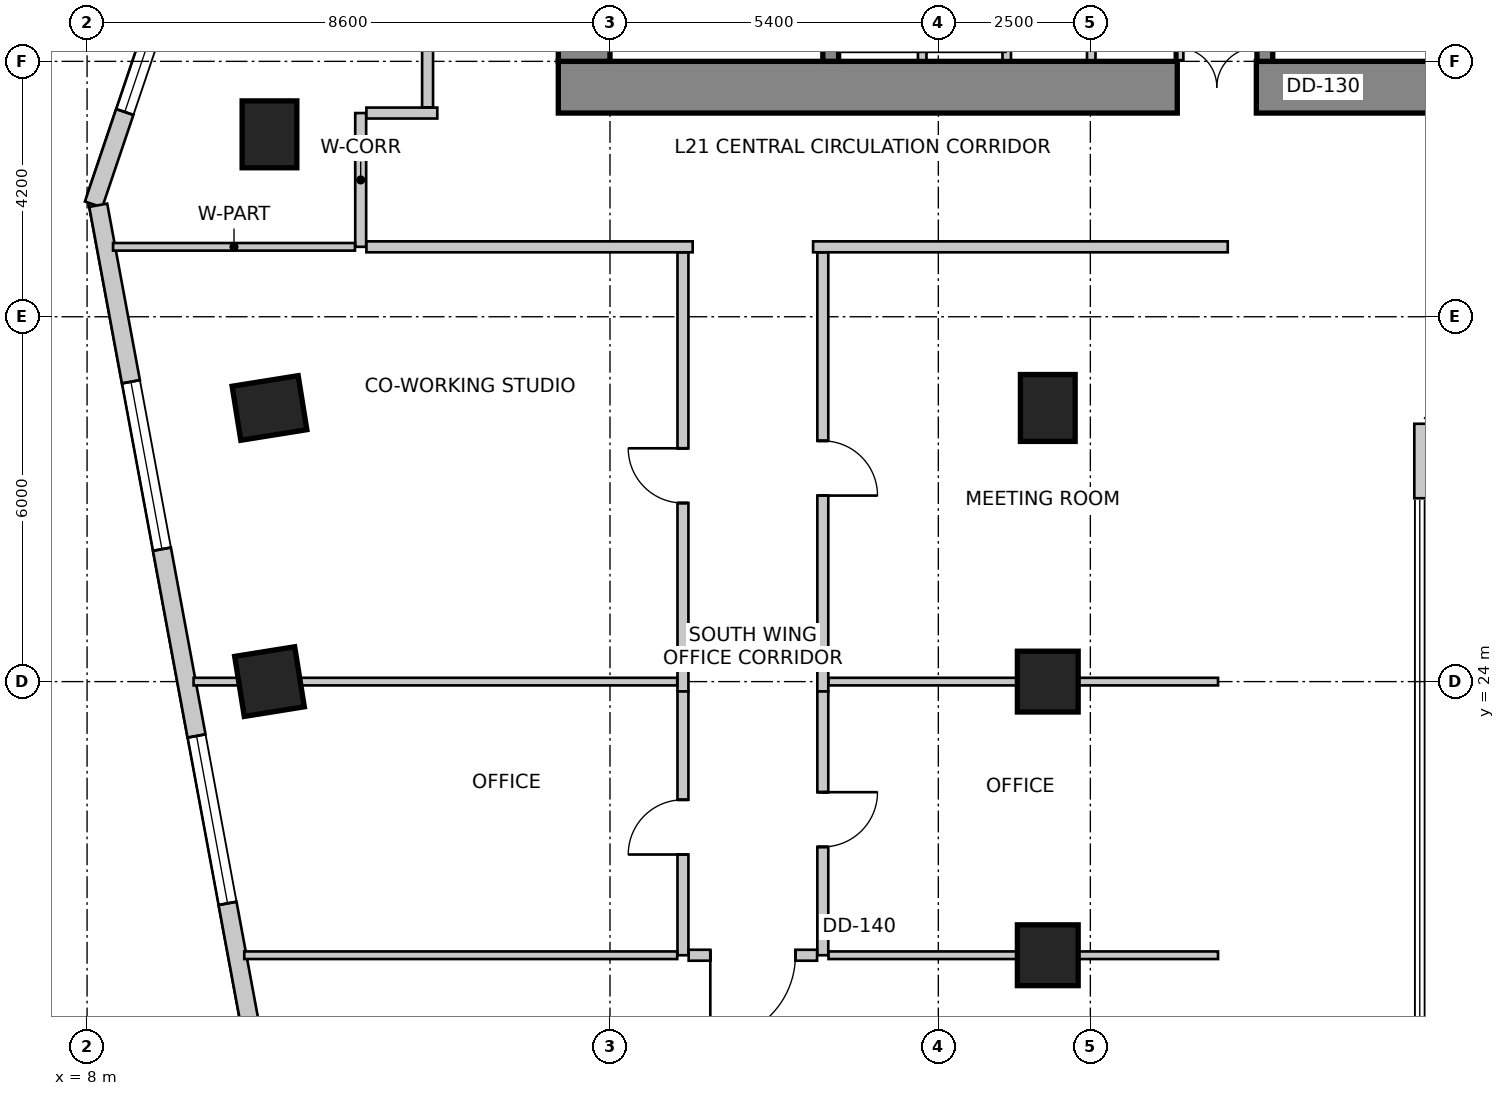
"""IFC4 building model, lengths in metres.
Left out: names, types, materials, properties, quantities, classifications, styles, units other than length and angle.
Written with IfcOpenShell. Run it as: python <this file> out.ifc"""

import sys

from ifc_helpers import new_model, si_unit, direction, frame, frame_2d, origin, origin_2d, place, context, subcontext, project, spatial, rectangle, extrude, source, transform, mapped, element, fill, save


model = new_model("IFC4")
c1 = context("Model", 3, precision=1e-05, world=origin(), true_north=direction((0.0, 1.0)))
c2 = subcontext(c1, "Body", "Model", "MODEL_VIEW")
j1 = project(units=[si_unit("LENGTHUNIT", "METRE"), si_unit("PLANEANGLEUNIT", "RADIAN")], contexts=[c1])
p1 = place(None, origin())
s1 = spatial("IfcSite", under=j1, at=p1, CompositionType="ELEMENT")
p2 = place(p1, origin())
s2 = spatial("IfcBuilding", under=s1, at=p2, CompositionType="ELEMENT")
p3 = place(p2, frame((0.0, 0.0, 87.0)))
s3 = spatial("IfcBuildingStorey", under=s2, at=p3, CompositionType="ELEMENT", Elevation=87.0)
p4 = place(p3, frame((15.75, 33.775, 0.0), z_axis=(0.0, 0.0, 1.0), x_axis=(1.0, 0.0, 0.0)))
e1 = element("IfcWall", 1, at=p4, inside=s3, PredefinedType="SHEAR", context=c2, shape_type="SweptSolid", body=[
    extrude(rectangle(XDim=16.1, YDim=0.85, at=frame_2d((8.05, 0.0))), origin(), (0.0, 0.0, 1.0), 4.0),
])
m1 = source(origin(), c2, "Body", "SweptSolid", [
    extrude(rectangle(XDim=1.3, YDim=2.15, at=frame_2d((0.65, 1.075))), frame((0.0, 0.435, 0.0), z_axis=(0.0, -1.0, 0.0), x_axis=(1.0, 0.0, 0.0)), (0.0, 0.0, 1.0), 0.87),
])
p5 = place(p4, frame((10.18, 0.0, 0.0)))
e2 = element("IfcOpeningElement", 2, at=p5, cuts=e1, PredefinedType="OPENING", context=c2, shape_type="MappedRepresentation", body=[
    mapped(m1, transform((0.0, 0.0, 0.0), scale=1.0)),
])
p6 = place(p3, frame((16.175, 34.2, 0.0), z_axis=(0.0, 0.0, 1.0), x_axis=(0.0, 1.0, 0.0)))
e3 = element("IfcWall", 3, at=p6, inside=s3, PredefinedType="SHEAR", context=c2, shape_type="SweptSolid", body=[
    extrude(rectangle(XDim=11.4, YDim=0.85, at=frame_2d((5.7, 0.0))), origin(), (0.0, 0.0, 1.0), 4.0),
])
m2 = source(origin(), c2, "Body", "SweptSolid", [
    extrude(rectangle(XDim=1.1, YDim=2.15, at=frame_2d((0.55, 1.075))), frame((0.0, 0.435, 0.0), z_axis=(0.0, -1.0, 0.0), x_axis=(1.0, 0.0, 0.0)), (0.0, 0.0, 1.0), 0.87),
])
p7 = place(p6, frame((7.15, 0.0, 0.0)))
e4 = element("IfcOpeningElement", 4, at=p7, cuts=e3, PredefinedType="OPENING", context=c2, shape_type="MappedRepresentation", body=[
    mapped(m2, transform((0.0, 0.0, 0.0), scale=1.0)),
])
p8 = place(p3, frame((20.23, 34.2, 0.0), z_axis=(0.0, 0.0, 1.0), x_axis=(0.0, 1.0, 0.0)))
e5 = element("IfcWall", 5, at=p8, inside=s3, PredefinedType="SHEAR", context=c2, shape_type="SweptSolid", body=[
    extrude(rectangle(XDim=9.06, YDim=0.26, at=frame_2d((4.53, 0.0))), origin(), (0.0, 0.0, 1.0), 4.0),
])
m3 = source(origin(), c2, "Body", "SweptSolid", [
    extrude(rectangle(XDim=1.1, YDim=2.15, at=frame_2d((0.55, 1.075))), frame((0.0, 0.14, 0.0), z_axis=(0.0, -1.0, 0.0), x_axis=(1.0, 0.0, 0.0)), (0.0, 0.0, 1.0), 0.28),
])
p9 = place(p8, frame((7.45, 0.0, 0.0)))
e6 = element("IfcOpeningElement", 6, at=p9, cuts=e5, PredefinedType="OPENING", context=c2, shape_type="MappedRepresentation", body=[
    mapped(m3, transform((0.0, 0.0, 0.0), scale=1.0)),
])
p10 = place(p3, frame((27.37, 34.2, 0.0), z_axis=(0.0, 0.0, 1.0), x_axis=(0.0, 1.0, 0.0)))
e7 = element("IfcWall", 7, at=p10, inside=s3, PredefinedType="SHEAR", context=c2, shape_type="SweptSolid", body=[
    extrude(rectangle(XDim=9.06, YDim=0.26, at=frame_2d((4.53, 0.0))), origin(), (0.0, 0.0, 1.0), 4.0),
])
p11 = place(p10, frame((7.45, 0.0, 0.0)))
e8 = element("IfcOpeningElement", 8, at=p11, cuts=e7, PredefinedType="OPENING", context=c2, shape_type="MappedRepresentation", body=[
    mapped(m3, transform((0.0, 0.0, 0.0), scale=1.0)),
])
m4 = source(origin(), c2, "Body", "SweptSolid", [
    extrude(rectangle(XDim=0.9, YDim=1.1, at=origin_2d()), origin(), (0.0, 0.0, 1.0), 4.0),
])
for number, where, z_axis, x_axis in (
    (9, (11.0, 33.0, 0.0), (0.0, 0.0, 1.0), (1.0, 0.0, 0.0)),
    (10, (11.0, 28.5, 0.0), (0.0, 0.0, 1.0), (0.158, -0.987, 0.0)),
):
    element("IfcColumn", number, at=place(p3, frame(where, z_axis=z_axis, x_axis=x_axis)), inside=s3, PredefinedType="COLUMN", context=c2, shape_type="MappedRepresentation", body=[
        mapped(m4, transform((0.0, 0.0, 0.0), scale=1.0)),
    ])
m5 = source(origin(), c2, "Body", "SweptSolid", [
    extrude(rectangle(XDim=1.0, YDim=1.0, at=origin_2d()), origin(), (0.0, 0.0, 1.0), 4.0),
])
p12 = place(p3, frame((11.0, 24.0, 0.0), z_axis=(0.0, 0.0, 1.0), x_axis=(0.158158067254, -0.987413806751, 0.0)))
e11 = element("IfcColumn", 11, at=p12, inside=s3, PredefinedType="COLUMN", context=c2, shape_type="MappedRepresentation", body=[
    mapped(m5, transform((0.0, 0.0, 0.0), scale=1.0)),
])
p13 = place(p3, frame((23.8, 28.5, 0.0), z_axis=(0.0, 0.0, 1.0), x_axis=(1.0, 0.0, 0.0)))
e12 = element("IfcColumn", 12, at=p13, inside=s3, PredefinedType="COLUMN", context=c2, shape_type="MappedRepresentation", body=[
    mapped(m4, transform((0.0, 0.0, 0.0), scale=1.0)),
])
for number, where, z_axis, x_axis in (
    (13, (23.8, 24.0, 0.0), (0.0, 0.0, 1.0), (1.0, 0.0, 0.0)),
    (14, (23.8, 19.5, 0.0), (0.0, 0.0, 1.0), (1.0, 0.0, 0.0)),
):
    element("IfcColumn", number, at=place(p3, frame(where, z_axis=z_axis, x_axis=x_axis)), inside=s3, PredefinedType="COLUMN", context=c2, shape_type="MappedRepresentation", body=[
        mapped(m5, transform((0.0, 0.0, 0.0), scale=1.0)),
    ])
p14 = place(p3, frame((29.978, 27.015, 0.0), z_axis=(0.0, 0.0, 1.0), x_axis=(0.0, 1.0, 0.0)))
e15 = element("IfcWall", 15, at=p14, inside=s3, PredefinedType="SOLIDWALL", context=c2, shape_type="SweptSolid", body=[
    extrude(rectangle(XDim=1.225, YDim=0.3, at=frame_2d((0.612, 0.0))), origin(), (0.0, 0.0, 1.0), 3.75),
])
p15 = place(p3, frame((13.269, 47.134, 0.0), z_axis=(0.0, 0.0, 1.0), x_axis=(-0.319920423265, -0.947444416722, 0.0)))
e16 = element("IfcWall", 16, at=p15, inside=s3, PredefinedType="SOLIDWALL", context=c2, shape_type="SweptSolid", body=[
    extrude(rectangle(XDim=16.135, YDim=0.3, at=frame_2d((8.067, 0.0))), origin(), (0.0, 0.0, 1.0), 3.75),
])
m6 = source(origin(), c2, "Body", "SweptSolid", [
    extrude(rectangle(XDim=2.4, YDim=2.2, at=frame_2d((1.2, 1.1))), frame((0.0, 0.16, 0.0), z_axis=(0.0, -1.0, 0.0), x_axis=(1.0, 0.0, 0.0)), (0.0, 0.0, 1.0), 0.32),
])
p16 = place(p15, frame((2.188, 0.0, 0.85)))
e17 = element("IfcOpeningElement", 17, at=p16, cuts=e16, PredefinedType="OPENING", context=c2, shape_type="MappedRepresentation", body=[
    mapped(m6, transform((0.0, 0.0, 0.0), scale=1.0)),
])
m7 = source(origin(), c2, "Body", "SweptSolid", [
    extrude(rectangle(XDim=2.8, YDim=2.4, at=frame_2d((1.4, 1.2))), frame((0.0, 0.16, 0.0), z_axis=(0.0, -1.0, 0.0), x_axis=(1.0, 0.0, 0.0)), (0.0, 0.0, 1.0), 0.32),
])
p17 = place(p15, frame((6.959, 0.0, 0.85)))
e18 = element("IfcOpeningElement", 18, at=p17, cuts=e16, PredefinedType="OPENING", context=c2, shape_type="MappedRepresentation", body=[
    mapped(m7, transform((0.0, 0.0, 0.0), scale=1.0)),
])
p18 = place(p15, frame((12.13, 0.0, 0.85)))
e19 = element("IfcOpeningElement", 19, at=p18, cuts=e16, PredefinedType="OPENING", context=c2, shape_type="MappedRepresentation", body=[
    mapped(m6, transform((0.0, 0.0, 0.0), scale=1.0)),
])
p19 = place(p3, frame((8.183, 31.833, 0.0), z_axis=(0.0, 0.0, 1.0), x_axis=(0.18216364648, -0.983268226834, 0.0)))
e20 = element("IfcWall", 20, at=p19, inside=s3, PredefinedType="SOLIDWALL", context=c2, shape_type="SweptSolid", body=[
    extrude(rectangle(XDim=26.678, YDim=0.3, at=frame_2d((13.339, 0.0))), origin(), (0.0, 0.0, 1.0), 3.75),
])
p20 = place(p19, frame((2.952, 0.0, 0.85)))
e21 = element("IfcOpeningElement", 21, at=p20, cuts=e20, PredefinedType="OPENING", context=c2, shape_type="MappedRepresentation", body=[
    mapped(m7, transform((0.0, 0.0, 0.0), scale=1.0)),
])
p21 = place(p19, frame((8.876, 0.0, 0.85)))
e22 = element("IfcOpeningElement", 22, at=p21, cuts=e20, PredefinedType="OPENING", context=c2, shape_type="MappedRepresentation", body=[
    mapped(m7, transform((0.0, 0.0, 0.0), scale=1.0)),
])
p22 = place(p19, frame((13.647, 0.0, 0.85)))
e23 = element("IfcOpeningElement", 23, at=p22, cuts=e20, PredefinedType="OPENING", context=c2, shape_type="MappedRepresentation", body=[
    mapped(m7, transform((0.0, 0.0, 0.0), scale=1.0)),
])
p23 = place(p19, frame((18.372, 0.0, 0.85)))
e24 = element("IfcOpeningElement", 24, at=p23, cuts=e20, PredefinedType="OPENING", context=c2, shape_type="MappedRepresentation", body=[
    mapped(m6, transform((0.0, 0.0, 0.0), scale=1.0)),
])
p24 = place(p19, frame((22.696, 0.0, 0.85)))
e25 = element("IfcOpeningElement", 25, at=p24, cuts=e20, PredefinedType="OPENING", context=c2, shape_type="MappedRepresentation", body=[
    mapped(m7, transform((0.0, 0.0, 0.0), scale=1.0)),
])
for number, where, z_axis, x_axis in (
    (26, (25.96, 34.22, 0.0), (0.0, 0.0, 1.0), (0.0, 1.0, 0.0)),
    (27, (21.735, 34.22, 0.0), (0.0, 0.0, 1.0), (0.0, 1.0, 0.0)),
    (28, (23.125, 34.22, 0.0), (0.0, 0.0, 1.0), (0.0, 1.0, 0.0)),
    (29, (24.515, 34.22, 0.0), (0.0, 0.0, 1.0), (0.0, 1.0, 0.0)),
):
    element("IfcWall", number, at=place(p3, frame(where, z_axis=z_axis, x_axis=x_axis)), inside=s3, PredefinedType="SOLIDWALL", context=c2, shape_type="SweptSolid", body=[
        extrude(rectangle(XDim=1.62, YDim=0.14, at=frame_2d((0.81, 0.0))), origin(), (0.0, 0.0, 1.0), 3.042),
    ])
p25 = place(p3, frame((12.5, 31.15, 0.0), z_axis=(0.0, 0.0, 1.0), x_axis=(0.0, 1.0, 0.0)))
e30 = element("IfcWall", 30, at=p25, inside=s3, PredefinedType="PARTITIONING", context=c2, shape_type="SweptSolid", body=[
    extrude(rectangle(XDim=2.2, YDim=0.18, at=frame_2d((1.1, 0.0))), origin(), (0.0, 0.0, 1.0), 3.335),
])
p26 = place(p3, frame((12.594, 33.35, 0.0), z_axis=(0.0, 0.0, 1.0), x_axis=(1.0, 0.0, 0.0)))
e31 = element("IfcWall", 31, at=p26, inside=s3, PredefinedType="PARTITIONING", context=c2, shape_type="SweptSolid", body=[
    extrude(rectangle(XDim=1.166, YDim=0.18, at=frame_2d((0.583, 0.0))), origin(), (0.0, 0.0, 1.0), 3.75),
])
p27 = place(p3, frame((17.96, 31.15, 0.0), z_axis=(0.0, 0.0, 1.0), x_axis=(-1.0, 0.0, 0.0)))
e32 = element("IfcWall", 32, at=p27, inside=s3, PredefinedType="PARTITIONING", context=c2, shape_type="SweptSolid", body=[
    extrude(rectangle(XDim=5.366, YDim=0.18, at=frame_2d((2.683, 0.0))), origin(), (0.0, 0.0, 1.0), 3.335),
])
p28 = place(p3, frame((26.76, 31.15, 0.0), z_axis=(0.0, 0.0, 1.0), x_axis=(-1.0, 0.0, 0.0)))
e33 = element("IfcWall", 33, at=p28, inside=s3, PredefinedType="PARTITIONING", context=c2, shape_type="SweptSolid", body=[
    extrude(rectangle(XDim=6.82, YDim=0.18, at=frame_2d((3.41, 0.0))), origin(), (0.0, 0.0, 1.0), 3.335),
])
p29 = place(p3, frame((13.6, 33.444, 0.0), z_axis=(0.0, 0.0, 1.0), x_axis=(0.0, 1.0, 0.0)))
e34 = element("IfcWall", 34, at=p29, inside=s3, PredefinedType="PARTITIONING", context=c2, shape_type="SweptSolid", body=[
    extrude(rectangle(XDim=13.896, YDim=0.18, at=frame_2d((6.948, 0.0))), origin(), (0.0, 0.0, 1.0), 2.892),
])
m8 = source(origin(), c2, "Body", "SweptSolid", [
    extrude(rectangle(XDim=0.9, YDim=2.15, at=frame_2d((0.45, 1.075))), frame((0.0, 0.1, 0.0), z_axis=(0.0, -1.0, 0.0), x_axis=(1.0, 0.0, 0.0)), (0.0, 0.0, 1.0), 0.2),
])
p30 = place(p29, frame((4.144, 0.0, 0.0)))
e35 = element("IfcOpeningElement", 35, at=p30, cuts=e34, PredefinedType="OPENING", context=c2, shape_type="MappedRepresentation", body=[
    mapped(m8, transform((0.0, 0.0, 0.0), scale=1.0)),
])
p31 = place(p3, frame((12.406, 31.15, 0.0), z_axis=(0.0, 0.0, 1.0), x_axis=(-1.0, 0.0, 0.0)))
e36 = element("IfcWall", 36, at=p31, inside=s3, PredefinedType="PARTITIONING", context=c2, shape_type="SweptSolid", body=[
    extrude(rectangle(XDim=3.979, YDim=0.125, at=frame_2d((1.99, 0.0))), origin(), (0.0, 0.0, 1.0), 2.892),
])
p32 = place(p3, frame((17.8, 23.84, 0.0), z_axis=(0.0, 0.0, 1.0), x_axis=(0.0, 1.0, 0.0)))
e37 = element("IfcWall", 37, at=p32, inside=s3, PredefinedType="PARTITIONING", context=c2, shape_type="SweptSolid", body=[
    extrude(rectangle(XDim=7.216, YDim=0.18, at=frame_2d((3.608, 0.0))), origin(), (0.0, 0.0, 1.0), 3.125),
])
p33 = place(p32, frame((3.097, 0.0, 0.0)))
e38 = element("IfcOpeningElement", 38, at=p33, cuts=e37, PredefinedType="OPENING", context=c2, shape_type="MappedRepresentation", body=[
    mapped(m8, transform((0.0, 0.0, 0.0), scale=1.0)),
])
p34 = place(p3, frame((17.8, 19.5, 0.0), z_axis=(0.0, 0.0, 1.0), x_axis=(0.0, 1.0, 0.0)))
e39 = element("IfcWall", 39, at=p34, inside=s3, PredefinedType="PARTITIONING", context=c2, shape_type="SweptSolid", body=[
    extrude(rectangle(XDim=4.338, YDim=0.18, at=frame_2d((2.169, 0.0))), origin(), (0.0, 0.0, 1.0), 3.188),
])
p35 = place(p34, frame((1.656, 0.0, 0.0)))
e40 = element("IfcOpeningElement", 40, at=p35, cuts=e39, PredefinedType="OPENING", context=c2, shape_type="MappedRepresentation", body=[
    mapped(m8, transform((0.0, 0.0, 0.0), scale=1.0)),
])
p36 = place(p3, frame((20.1, 31.056, 0.0), z_axis=(0.0, 0.0, 1.0), x_axis=(0.0, -1.0, 0.0)))
e41 = element("IfcWall", 41, at=p36, inside=s3, PredefinedType="PARTITIONING", context=c2, shape_type="SweptSolid", body=[
    extrude(rectangle(XDim=7.216, YDim=0.18, at=frame_2d((3.608, 0.0))), origin(), (0.0, 0.0, 1.0), 3.125),
])
p37 = place(p36, frame((3.097, 0.0, 0.0)))
e42 = element("IfcOpeningElement", 42, at=p37, cuts=e41, PredefinedType="OPENING", context=c2, shape_type="MappedRepresentation", body=[
    mapped(m8, transform((0.0, 0.0, 0.0), scale=1.0)),
])
p38 = place(p3, frame((20.1, 23.838, 0.0), z_axis=(0.0, 0.0, 1.0), x_axis=(0.0, -1.0, 0.0)))
e43 = element("IfcWall", 43, at=p38, inside=s3, PredefinedType="PARTITIONING", context=c2, shape_type="SweptSolid", body=[
    extrude(rectangle(XDim=4.338, YDim=0.18, at=frame_2d((2.169, 0.0))), origin(), (0.0, 0.0, 1.0), 3.188),
])
p39 = place(p38, frame((1.656, 0.0, 0.0)))
e44 = element("IfcOpeningElement", 44, at=p39, cuts=e43, PredefinedType="OPENING", context=c2, shape_type="MappedRepresentation", body=[
    mapped(m8, transform((0.0, 0.0, 0.0), scale=1.0)),
])
p40 = place(p3, frame((20.006, 19.5, 0.0), z_axis=(0.0, 0.0, 1.0), x_axis=(-1.0, 0.0, 0.0)))
e45 = element("IfcWall", 45, at=p40, inside=s3, PredefinedType="PARTITIONING", context=c2, shape_type="SweptSolid", body=[
    extrude(rectangle(XDim=2.112, YDim=0.18, at=frame_2d((1.056, 0.0))), origin(), (0.0, 0.0, 1.0), 3.75),
])
m9 = source(origin(), c2, "Body", "SweptSolid", [
    extrude(rectangle(XDim=1.4, YDim=2.15, at=frame_2d((0.7, 1.075))), frame((0.0, 0.1, 0.0), z_axis=(0.0, -1.0, 0.0), x_axis=(1.0, 0.0, 0.0)), (0.0, 0.0, 1.0), 0.2),
])
p41 = place(p40, frame((0.356, 0.0, 0.0)))
e46 = element("IfcOpeningElement", 46, at=p41, cuts=e45, PredefinedType="OPENING", context=c2, shape_type="MappedRepresentation", body=[
    mapped(m9, transform((0.0, 0.0, 0.0), scale=1.0)),
])
p42 = place(p3, frame((17.706, 24.0, 0.0), z_axis=(0.0, 0.0, 1.0), x_axis=(-1.0, 0.0, 0.0)))
e47 = element("IfcWall", 47, at=p42, inside=s3, PredefinedType="PARTITIONING", context=c2, shape_type="SweptSolid", body=[
    extrude(rectangle(XDim=7.954, YDim=0.125, at=frame_2d((3.977, 0.0))), origin(), (0.0, 0.0, 1.0), 2.892),
])
p43 = place(p3, frame((17.706, 19.5, 0.0), z_axis=(0.0, 0.0, 1.0), x_axis=(-1.0, 0.0, 0.0)))
e48 = element("IfcWall", 48, at=p43, inside=s3, PredefinedType="PARTITIONING", context=c2, shape_type="SweptSolid", body=[
    extrude(rectangle(XDim=7.121, YDim=0.125, at=frame_2d((3.561, 0.0))), origin(), (0.0, 0.0, 1.0), 3.75),
])
for number, where, z_axis, x_axis in (
    (49, (26.6, 24.0, 0.0), (0.0, 0.0, 1.0), (-1.0, 0.0, 0.0)),
    (50, (26.6, 19.5, 0.0), (0.0, 0.0, 1.0), (-1.0, 0.0, 0.0)),
):
    element("IfcWall", number, at=place(p3, frame(where, z_axis=z_axis, x_axis=x_axis)), inside=s3, PredefinedType="PARTITIONING", context=c2, shape_type="SweptSolid", body=[
        extrude(rectangle(XDim=6.406, YDim=0.125, at=frame_2d((3.203, 0.0))), origin(), (0.0, 0.0, 1.0), 2.892),
    ])
m10 = source(origin(), c2, "Body", "SweptSolid", [
    extrude(rectangle(XDim=2.4, YDim=2.2, at=frame_2d((1.2, 1.1))), frame((0.0, -0.015, 0.0), z_axis=(0.0, -1.0, 0.0), x_axis=(1.0, 0.0, 0.0)), (0.0, 0.0, 1.0), 0.06),
])
p44 = place(p18, origin())
e51 = element("IfcWindow", 51, at=p44, inside=s3, PartitioningType="SINGLE_PANEL", PredefinedType="WINDOW", context=c2, shape_type="MappedRepresentation", body=[
    mapped(m10, transform((0.0, 0.0, 0.0), scale=1.0)),
])
fill(e19, e51)
m11 = source(origin(), c2, "Body", "SweptSolid", [
    extrude(rectangle(XDim=2.8, YDim=2.4, at=frame_2d((1.4, 1.2))), frame((0.0, -0.015, 0.0), z_axis=(0.0, -1.0, 0.0), x_axis=(1.0, 0.0, 0.0)), (0.0, 0.0, 1.0), 0.06),
])
p45 = place(p20, origin())
e52 = element("IfcWindow", 52, at=p45, inside=s3, PartitioningType="SINGLE_PANEL", PredefinedType="WINDOW", context=c2, shape_type="MappedRepresentation", body=[
    mapped(m11, transform((0.0, 0.0, 0.0), scale=1.0)),
])
fill(e21, e52)
p46 = place(p21, origin())
e53 = element("IfcWindow", 53, at=p46, inside=s3, PartitioningType="SINGLE_PANEL", PredefinedType="WINDOW", context=c2, shape_type="MappedRepresentation", body=[
    mapped(m11, transform((0.0, 0.0, 0.0), scale=1.0)),
])
fill(e22, e53)
m12 = source(origin(), c2, "Body", "SweptSolid", [
    extrude(rectangle(XDim=1.3, YDim=2.15, at=frame_2d((0.65, 1.075))), frame((0.0, 0.025, 0.0), z_axis=(0.0, -1.0, 0.0), x_axis=(1.0, 0.0, 0.0)), (0.0, 0.0, 1.0), 0.05),
])
p47 = place(p5, origin())
e54 = element("IfcDoor", 54, at=p47, inside=s3, OperationType="DOUBLE_DOOR_SINGLE_SWING", PredefinedType="DOOR", context=c2, shape_type="MappedRepresentation", body=[
    mapped(m12, transform((0.0, 0.0, 0.0), scale=1.0)),
])
fill(e2, e54)
m13 = source(origin(), c2, "Body", "SweptSolid", [
    extrude(rectangle(XDim=0.9, YDim=2.15, at=frame_2d((0.45, 1.075))), frame((0.0, 0.025, 0.0), z_axis=(0.0, -1.0, 0.0), x_axis=(1.0, 0.0, 0.0)), (0.0, 0.0, 1.0), 0.05),
])
p48 = place(p33, origin())
e55 = element("IfcDoor", 55, at=p48, inside=s3, OperationType="SINGLE_SWING_RIGHT", PredefinedType="DOOR", context=c2, shape_type="MappedRepresentation", body=[
    mapped(m13, transform((0.0, 0.0, 0.0), scale=1.0)),
])
fill(e38, e55)
p49 = place(p35, origin())
e56 = element("IfcDoor", 56, at=p49, inside=s3, OperationType="SINGLE_SWING_LEFT", PredefinedType="DOOR", context=c2, shape_type="MappedRepresentation", body=[
    mapped(m13, transform((0.0, 0.0, 0.0), scale=1.0)),
])
fill(e40, e56)
p50 = place(p37, origin())
e57 = element("IfcDoor", 57, at=p50, inside=s3, OperationType="SINGLE_SWING_RIGHT", PredefinedType="DOOR", context=c2, shape_type="MappedRepresentation", body=[
    mapped(m13, transform((0.0, 0.0, 0.0), scale=1.0)),
])
fill(e42, e57)
p51 = place(p39, origin())
e58 = element("IfcDoor", 58, at=p51, inside=s3, OperationType="SINGLE_SWING_LEFT", PredefinedType="DOOR", context=c2, shape_type="MappedRepresentation", body=[
    mapped(m13, transform((0.0, 0.0, 0.0), scale=1.0)),
])
fill(e44, e58)
m14 = source(origin(), c2, "Body", "SweptSolid", [
    extrude(rectangle(XDim=1.4, YDim=2.15, at=frame_2d((0.7, 1.075))), frame((0.0, 0.025, 0.0), z_axis=(0.0, -1.0, 0.0), x_axis=(1.0, 0.0, 0.0)), (0.0, 0.0, 1.0), 0.05),
])
p52 = place(p41, origin())
e59 = element("IfcDoor", 59, at=p52, inside=s3, OperationType="SINGLE_SWING_RIGHT", PredefinedType="DOOR", context=c2, shape_type="MappedRepresentation", body=[
    mapped(m14, transform((0.0, 0.0, 0.0), scale=1.0)),
])
fill(e46, e59)
save(model, sys.argv[1])
